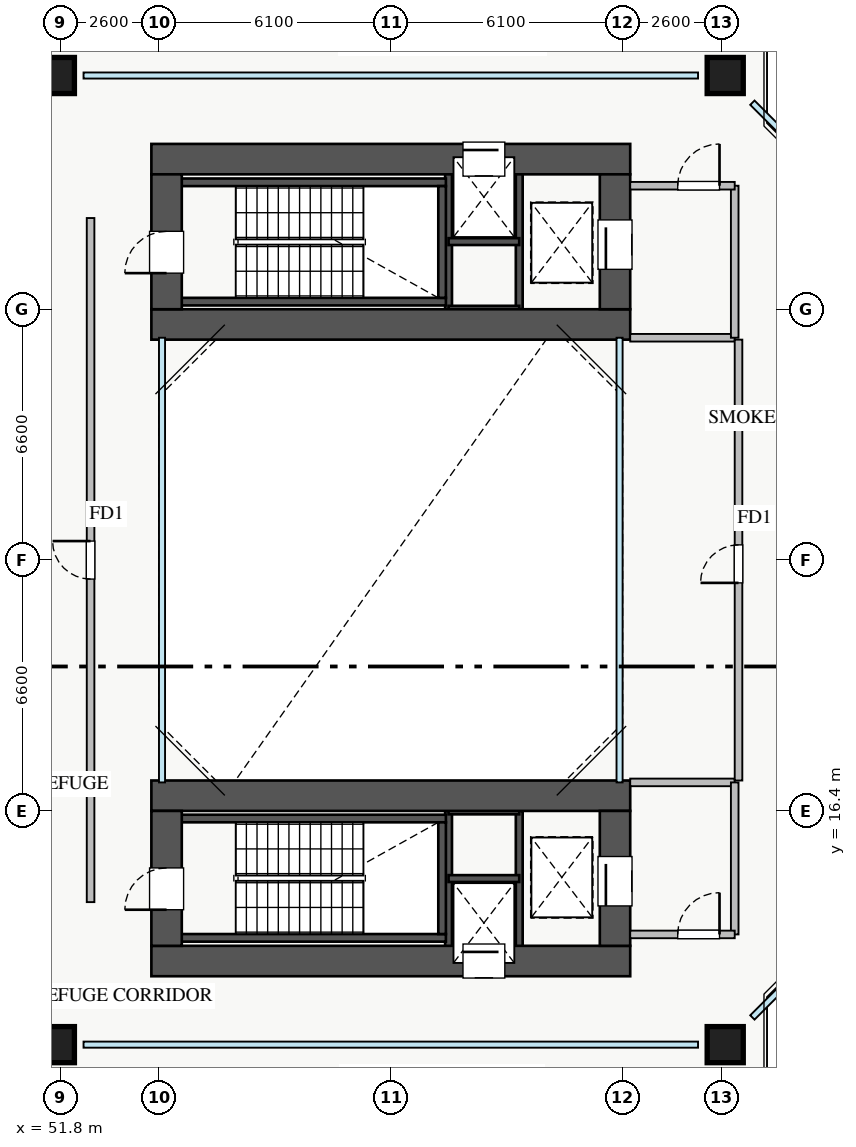
"""IFC4 building model, lengths in metres.
Left out: names, types, materials, properties, quantities, classifications, styles, units other than length and angle.
Written with IfcOpenShell. Run it as: python <this file> out.ifc"""

import sys

from ifc_helpers import new_model, si_unit, direction, frame, frame_2d, origin, origin_2d, place, context, subcontext, project, spatial, rectangle, extrude, source, transform, mapped, element, fill, save


model = new_model("IFC4")
c1 = context("Model", 3, precision=1e-05, world=origin(), true_north=direction((0.0, 1.0)))
c2 = subcontext(c1, "Body", "Model", "MODEL_VIEW")
j1 = project(units=[si_unit("LENGTHUNIT", "METRE"), si_unit("PLANEANGLEUNIT", "RADIAN")], contexts=[c1])
p1 = place(None, origin())
s1 = spatial("IfcSite", under=j1, at=p1, CompositionType="ELEMENT")
p2 = place(p1, origin())
s2 = spatial("IfcBuilding", under=s1, at=p2, CompositionType="ELEMENT")
p3 = place(p2, frame((0.0, 0.0, 45.75)))
s3 = spatial("IfcBuildingStorey", under=s2, at=p3, CompositionType="ELEMENT", Elevation=45.75)
for number, where, z_axis, x_axis in (
    (1, (62.02, 29.6, 0.0), (0.0, 0.0, 1.0), (0.0, 1.0, 0.0)),
    (2, (63.88, 29.6, 0.0), (0.0, 0.0, 1.0), (0.0, 1.0, 0.0)),
):
    element("IfcWall", number, at=place(p3, frame(where, z_axis=z_axis, x_axis=x_axis)), inside=s3, PredefinedType="SHEAR", context=c2, shape_type="SweptSolid", body=[
        extrude(rectangle(XDim=3.95, YDim=0.18, at=frame_2d((1.975, 0.0))), origin(), (0.0, 0.0, 1.0), 4.32),
    ])
for number, where, z_axis, x_axis in (
    (3, (62.02, 31.38, 0.0), (0.0, 0.0, 1.0), (1.0, 0.0, 0.0)),
    (4, (62.02, 29.6, 0.0), (0.0, 0.0, 1.0), (1.0, 0.0, 0.0)),
):
    element("IfcWall", number, at=place(p3, frame(where, z_axis=z_axis, x_axis=x_axis)), inside=s3, PredefinedType="SHEAR", context=c2, shape_type="SweptSolid", body=[
        extrude(rectangle(XDim=1.86, YDim=0.18, at=frame_2d((0.93, 0.0))), origin(), (0.0, 0.0, 1.0), 4.32),
    ])
for number, where, z_axis, x_axis in (
    (5, (62.02, 12.45, 0.0), (0.0, 0.0, 1.0), (0.0, 1.0, 0.0)),
    (6, (63.88, 12.45, 0.0), (0.0, 0.0, 1.0), (0.0, 1.0, 0.0)),
):
    element("IfcWall", number, at=place(p3, frame(where, z_axis=z_axis, x_axis=x_axis)), inside=s3, PredefinedType="SHEAR", context=c2, shape_type="SweptSolid", body=[
        extrude(rectangle(XDim=3.95, YDim=0.18, at=frame_2d((1.975, 0.0))), origin(), (0.0, 0.0, 1.0), 4.32),
    ])
for number, where, z_axis, x_axis in (
    (7, (62.02, 14.62, 0.0), (0.0, 0.0, 1.0), (1.0, 0.0, 0.0)),
    (8, (62.02, 16.4, 0.0), (0.0, 0.0, 1.0), (1.0, 0.0, 0.0)),
):
    element("IfcWall", number, at=place(p3, frame(where, z_axis=z_axis, x_axis=x_axis)), inside=s3, PredefinedType="SHEAR", context=c2, shape_type="SweptSolid", body=[
        extrude(rectangle(XDim=1.86, YDim=0.18, at=frame_2d((0.93, 0.0))), origin(), (0.0, 0.0, 1.0), 4.32),
    ])
for number, where, z_axis, x_axis in (
    (9, (54.8, 29.8, 0.0), (0.0, 0.0, 1.0), (1.0, 0.0, 0.0)),
    (10, (54.8, 32.94, 0.0), (0.0, 0.0, 1.0), (1.0, 0.0, 0.0)),
):
    element("IfcWall", number, at=place(p3, frame(where, z_axis=z_axis, x_axis=x_axis)), inside=s3, PredefinedType="SHEAR", context=c2, shape_type="SweptSolid", body=[
        extrude(rectangle(XDim=7.15, YDim=0.2, at=frame_2d((3.575, 0.0))), origin(), (0.0, 0.0, 1.0), 4.5),
    ])
p4 = place(p3, frame((61.85, 29.9, 0.0), z_axis=(0.0, 0.0, 1.0), x_axis=(0.0, 1.0, 0.0)))
e11 = element("IfcWall", 11, at=p4, inside=s3, PredefinedType="SHEAR", context=c2, shape_type="SweptSolid", body=[
    extrude(rectangle(XDim=2.94, YDim=0.2, at=frame_2d((1.47, 0.0))), origin(), (0.0, 0.0, 1.0), 4.5),
])
for number, where, z_axis, x_axis in (
    (12, (54.8, 13.06, 0.0), (0.0, 0.0, 1.0), (1.0, 0.0, 0.0)),
    (13, (54.8, 16.2, 0.0), (0.0, 0.0, 1.0), (1.0, 0.0, 0.0)),
):
    element("IfcWall", number, at=place(p3, frame(where, z_axis=z_axis, x_axis=x_axis)), inside=s3, PredefinedType="SHEAR", context=c2, shape_type="SweptSolid", body=[
        extrude(rectangle(XDim=7.15, YDim=0.2, at=frame_2d((3.575, 0.0))), origin(), (0.0, 0.0, 1.0), 4.5),
    ])
p5 = place(p3, frame((61.85, 13.16, 0.0), z_axis=(0.0, 0.0, 1.0), x_axis=(0.0, 1.0, 0.0)))
e14 = element("IfcWall", 14, at=p5, inside=s3, PredefinedType="SHEAR", context=c2, shape_type="SweptSolid", body=[
    extrude(rectangle(XDim=2.94, YDim=0.2, at=frame_2d((1.47, 0.0))), origin(), (0.0, 0.0, 1.0), 4.5),
])
p6 = place(p3, frame((54.2, 29.2, 0.0), z_axis=(0.0, 0.0, 1.0), x_axis=(1.0, 0.0, 0.0)))
e15 = element("IfcWall", 15, at=p6, inside=s3, PredefinedType="SHEAR", context=c2, shape_type="SweptSolid", body=[
    extrude(rectangle(XDim=12.6, YDim=0.8, at=frame_2d((6.3, 0.0))), origin(), (0.0, 0.0, 1.0), 4.5),
])
p7 = place(p3, frame((54.2, 33.55, 0.0), z_axis=(0.0, 0.0, 1.0), x_axis=(1.0, 0.0, 0.0)))
e16 = element("IfcWall", 16, at=p7, inside=s3, PredefinedType="SHEAR", context=c2, shape_type="SweptSolid", body=[
    extrude(rectangle(XDim=12.6, YDim=0.8, at=frame_2d((6.3, 0.0))), origin(), (0.0, 0.0, 1.0), 4.5),
])
p8 = place(p7, frame((8.2, 0.0, 0.0)))
e17 = element("IfcOpeningElement", 17, at=p8, cuts=e16, PredefinedType="OPENING", context=c2, shape_type="SweptSolid", body=[
    extrude(rectangle(XDim=1.1, YDim=2.05, at=frame_2d((0.55, 1.025))), frame((0.0, 0.41, 0.0), z_axis=(0.0, -1.0, 0.0), x_axis=(1.0, 0.0, 0.0)), (0.0, 0.0, 1.0), 0.82),
])
p9 = place(p3, frame((54.6, 29.6, 0.0), z_axis=(0.0, 0.0, 1.0), x_axis=(0.0, 1.0, 0.0)))
e18 = element("IfcWall", 18, at=p9, inside=s3, PredefinedType="SHEAR", context=c2, shape_type="SweptSolid", body=[
    extrude(rectangle(XDim=3.55, YDim=0.8, at=frame_2d((1.775, 0.0))), origin(), (0.0, 0.0, 1.0), 4.5),
])
p10 = place(p9, frame((0.95, 0.0, 0.0)))
e19 = element("IfcOpeningElement", 19, at=p10, cuts=e18, PredefinedType="OPENING", context=c2, shape_type="SweptSolid", body=[
    extrude(rectangle(XDim=1.1, YDim=2.05, at=frame_2d((0.55, 1.025))), frame((0.0, 0.41, 0.0), z_axis=(0.0, -1.0, 0.0), x_axis=(1.0, 0.0, 0.0)), (0.0, 0.0, 1.0), 0.82),
])
p11 = place(p3, frame((66.4, 29.6, 0.0), z_axis=(0.0, 0.0, 1.0), x_axis=(0.0, 1.0, 0.0)))
e20 = element("IfcWall", 20, at=p11, inside=s3, PredefinedType="SHEAR", context=c2, shape_type="SweptSolid", body=[
    extrude(rectangle(XDim=3.55, YDim=0.8, at=frame_2d((1.775, 0.0))), origin(), (0.0, 0.0, 1.0), 4.5),
])
p12 = place(p11, frame((1.05, 0.0, 0.0)))
e21 = element("IfcOpeningElement", 21, at=p12, cuts=e20, PredefinedType="OPENING", context=c2, shape_type="SweptSolid", body=[
    extrude(rectangle(XDim=1.3, YDim=2.05, at=frame_2d((0.65, 1.025))), frame((0.0, 0.41, 0.0), z_axis=(0.0, -1.0, 0.0), x_axis=(1.0, 0.0, 0.0)), (0.0, 0.0, 1.0), 0.82),
])
p13 = place(p3, frame((54.2, 12.45, 0.0), z_axis=(0.0, 0.0, 1.0), x_axis=(1.0, 0.0, 0.0)))
e22 = element("IfcWall", 22, at=p13, inside=s3, PredefinedType="SHEAR", context=c2, shape_type="SweptSolid", body=[
    extrude(rectangle(XDim=12.6, YDim=0.8, at=frame_2d((6.3, 0.0))), origin(), (0.0, 0.0, 1.0), 4.5),
])
p14 = place(p13, frame((8.2, 0.0, 0.0)))
e23 = element("IfcOpeningElement", 23, at=p14, cuts=e22, PredefinedType="OPENING", context=c2, shape_type="SweptSolid", body=[
    extrude(rectangle(XDim=1.1, YDim=2.05, at=frame_2d((0.55, 1.025))), frame((0.0, 0.41, 0.0), z_axis=(0.0, -1.0, 0.0), x_axis=(1.0, 0.0, 0.0)), (0.0, 0.0, 1.0), 0.82),
])
p15 = place(p3, frame((54.2, 16.8, 0.0), z_axis=(0.0, 0.0, 1.0), x_axis=(1.0, 0.0, 0.0)))
e24 = element("IfcWall", 24, at=p15, inside=s3, PredefinedType="SHEAR", context=c2, shape_type="SweptSolid", body=[
    extrude(rectangle(XDim=12.6, YDim=0.8, at=frame_2d((6.3, 0.0))), origin(), (0.0, 0.0, 1.0), 4.5),
])
p16 = place(p3, frame((54.6, 12.85, 0.0), z_axis=(0.0, 0.0, 1.0), x_axis=(0.0, 1.0, 0.0)))
e25 = element("IfcWall", 25, at=p16, inside=s3, PredefinedType="SHEAR", context=c2, shape_type="SweptSolid", body=[
    extrude(rectangle(XDim=3.55, YDim=0.8, at=frame_2d((1.775, 0.0))), origin(), (0.0, 0.0, 1.0), 4.5),
])
p17 = place(p16, frame((0.95, 0.0, 0.0)))
e26 = element("IfcOpeningElement", 26, at=p17, cuts=e25, PredefinedType="OPENING", context=c2, shape_type="SweptSolid", body=[
    extrude(rectangle(XDim=1.1, YDim=2.05, at=frame_2d((0.55, 1.025))), frame((0.0, 0.41, 0.0), z_axis=(0.0, -1.0, 0.0), x_axis=(1.0, 0.0, 0.0)), (0.0, 0.0, 1.0), 0.82),
])
p18 = place(p3, frame((66.4, 12.85, 0.0), z_axis=(0.0, 0.0, 1.0), x_axis=(0.0, 1.0, 0.0)))
e27 = element("IfcWall", 27, at=p18, inside=s3, PredefinedType="SHEAR", context=c2, shape_type="SweptSolid", body=[
    extrude(rectangle(XDim=3.55, YDim=0.8, at=frame_2d((1.775, 0.0))), origin(), (0.0, 0.0, 1.0), 4.5),
])
p19 = place(p18, frame((1.05, 0.0, 0.0)))
e28 = element("IfcOpeningElement", 28, at=p19, cuts=e27, PredefinedType="OPENING", context=c2, shape_type="SweptSolid", body=[
    extrude(rectangle(XDim=1.3, YDim=2.05, at=frame_2d((0.65, 1.025))), frame((0.0, 0.41, 0.0), z_axis=(0.0, -1.0, 0.0), x_axis=(1.0, 0.0, 0.0)), (0.0, 0.0, 1.0), 0.82),
])
m1 = source(origin(), c2, "Body", "SweptSolid", [
    extrude(rectangle(XDim=0.95, YDim=0.95, at=origin_2d()), origin(), (0.0, 0.0, 1.0), 4.5),
])
for number, where, z_axis, x_axis in (
    (29, (51.7, 10.25, 0.0), (0.0, 0.0, 1.0), (1.0, 0.0, 0.0)),
    (30, (69.3, 10.25, 0.0), (0.0, 0.0, 1.0), (1.0, 0.0, 0.0)),
    (31, (69.3, 35.75, 0.0), (0.0, 0.0, 1.0), (1.0, 0.0, 0.0)),
    (32, (51.7, 35.75, 0.0), (0.0, 0.0, 1.0), (1.0, 0.0, 0.0)),
):
    element("IfcColumn", number, at=place(p3, frame(where, z_axis=z_axis, x_axis=x_axis)), inside=s3, PredefinedType="COLUMN", context=c2, shape_type="MappedRepresentation", body=[
        mapped(m1, transform((0.0, 0.0, 0.0), x_axis=(1.0, 0.0, 0.0), y_axis=(0.0, 1.0, 0.0), z_axis=(0.0, 0.0, 1.0), scale=1.0)),
    ])
p20 = place(p3, frame((66.8, 28.85, 0.0), z_axis=(0.0, 0.0, 1.0), x_axis=(1.0, 0.0, 0.0)))
e33 = element("IfcWall", 33, at=p20, inside=s3, PredefinedType="PARTITIONING", context=c2, shape_type="SweptSolid", body=[
    extrude(rectangle(XDim=2.75, YDim=0.2, at=frame_2d((1.375, 0.0))), origin(), (0.0, 0.0, 1.0), 4.32),
])
p21 = place(p3, frame((69.55, 28.85, 0.0), z_axis=(0.0, 0.0, 1.0), x_axis=(0.0, 1.0, 0.0)))
e34 = element("IfcWall", 34, at=p21, inside=s3, PredefinedType="PARTITIONING", context=c2, shape_type="SweptSolid", body=[
    extrude(rectangle(XDim=4.0, YDim=0.2, at=frame_2d((2.0, 0.0))), origin(), (0.0, 0.0, 1.0), 3.865),
])
p22 = place(p3, frame((66.8, 32.85, 0.0), z_axis=(0.0, 0.0, 1.0), x_axis=(1.0, 0.0, 0.0)))
e35 = element("IfcWall", 35, at=p22, inside=s3, PredefinedType="PARTITIONING", context=c2, shape_type="SweptSolid", body=[
    extrude(rectangle(XDim=2.75, YDim=0.2, at=frame_2d((1.375, 0.0))), origin(), (0.0, 0.0, 1.0), 4.32),
])
p23 = place(p22, frame((1.25, 0.0, 0.0)))
e36 = element("IfcOpeningElement", 36, at=p23, cuts=e35, PredefinedType="OPENING", context=c2, shape_type="SweptSolid", body=[
    extrude(rectangle(XDim=1.1, YDim=2.05, at=frame_2d((0.55, 1.025))), frame((0.0, 0.11, 0.0), z_axis=(0.0, -1.0, 0.0), x_axis=(1.0, 0.0, 0.0)), (0.0, 0.0, 1.0), 0.22),
])
p24 = place(p3, frame((66.8, 17.15, 0.0), z_axis=(0.0, 0.0, 1.0), x_axis=(1.0, 0.0, 0.0)))
e37 = element("IfcWall", 37, at=p24, inside=s3, PredefinedType="PARTITIONING", context=c2, shape_type="SweptSolid", body=[
    extrude(rectangle(XDim=2.75, YDim=0.2, at=frame_2d((1.375, 0.0))), origin(), (0.0, 0.0, 1.0), 4.32),
])
p25 = place(p3, frame((69.55, 13.15, 0.0), z_axis=(0.0, 0.0, 1.0), x_axis=(0.0, 1.0, 0.0)))
e38 = element("IfcWall", 38, at=p25, inside=s3, PredefinedType="PARTITIONING", context=c2, shape_type="SweptSolid", body=[
    extrude(rectangle(XDim=4.0, YDim=0.2, at=frame_2d((2.0, 0.0))), origin(), (0.0, 0.0, 1.0), 3.865),
])
p26 = place(p3, frame((66.8, 13.15, 0.0), z_axis=(0.0, 0.0, 1.0), x_axis=(1.0, 0.0, 0.0)))
e39 = element("IfcWall", 39, at=p26, inside=s3, PredefinedType="PARTITIONING", context=c2, shape_type="SweptSolid", body=[
    extrude(rectangle(XDim=2.75, YDim=0.2, at=frame_2d((1.375, 0.0))), origin(), (0.0, 0.0, 1.0), 4.32),
])
p27 = place(p26, frame((1.25, 0.0, 0.0)))
e40 = element("IfcOpeningElement", 40, at=p27, cuts=e39, PredefinedType="OPENING", context=c2, shape_type="SweptSolid", body=[
    extrude(rectangle(XDim=1.1, YDim=2.05, at=frame_2d((0.55, 1.025))), frame((0.0, 0.11, 0.0), z_axis=(0.0, -1.0, 0.0), x_axis=(1.0, 0.0, 0.0)), (0.0, 0.0, 1.0), 0.22),
])
p28 = place(p3, frame((52.6, 14.0, 0.0), z_axis=(0.0, 0.0, 1.0), x_axis=(0.0, 1.0, 0.0)))
e41 = element("IfcWall", 41, at=p28, inside=s3, PredefinedType="PARTITIONING", context=c2, shape_type="SweptSolid", body=[
    extrude(rectangle(XDim=18.0, YDim=0.2, at=frame_2d((9.0, 0.0))), origin(), (0.0, 0.0, 1.0), 4.32),
])
p29 = place(p28, frame((8.5, 0.0, 0.0)))
e42 = element("IfcOpeningElement", 42, at=p29, cuts=e41, PredefinedType="OPENING", context=c2, shape_type="SweptSolid", body=[
    extrude(rectangle(XDim=1.0, YDim=2.05, at=frame_2d((0.5, 1.025))), frame((0.0, 0.11, 0.0), z_axis=(0.0, -1.0, 0.0), x_axis=(1.0, 0.0, 0.0)), (0.0, 0.0, 1.0), 0.22),
])
p30 = place(p3, frame((69.65, 17.2, 0.0), z_axis=(0.0, 0.0, 1.0), x_axis=(0.0, 1.0, 0.0)))
e43 = element("IfcWall", 43, at=p30, inside=s3, PredefinedType="PARTITIONING", context=c2, shape_type="SweptSolid", body=[
    extrude(rectangle(XDim=11.6, YDim=0.2, at=frame_2d((5.8, 0.0))), origin(), (0.0, 0.0, 1.0), 4.32),
])
p31 = place(p30, frame((5.2, 0.0, 0.0)))
e44 = element("IfcOpeningElement", 44, at=p31, cuts=e43, PredefinedType="OPENING", context=c2, shape_type="SweptSolid", body=[
    extrude(rectangle(XDim=1.0, YDim=2.05, at=frame_2d((0.5, 1.025))), frame((0.0, 0.11, 0.0), z_axis=(0.0, -1.0, 0.0), x_axis=(1.0, 0.0, 0.0)), (0.0, 0.0, 1.0), 0.22),
])
m2 = source(origin(), c2, "Body", "SweptSolid", [
    extrude(rectangle(XDim=1.3, YDim=2.05, at=frame_2d((0.65, 1.025))), frame((0.0, 0.025, 0.0), z_axis=(0.0, -1.0, 0.0), x_axis=(1.0, 0.0, 0.0)), (0.0, 0.0, 1.0), 0.05),
])
p32 = place(p12, origin())
e45 = element("IfcDoor", 45, at=p32, inside=s3, OperationType="SLIDING_TO_LEFT", PredefinedType="DOOR", context=c2, shape_type="MappedRepresentation", body=[
    mapped(m2, transform((0.0, 0.0, 0.0), x_axis=(1.0, 0.0, 0.0), y_axis=(0.0, 1.0, 0.0), z_axis=(0.0, 0.0, 1.0), scale=1.0)),
])
fill(e21, e45)
m3 = source(origin(), c2, "Body", "SweptSolid", [
    extrude(rectangle(XDim=1.1, YDim=2.05, at=frame_2d((0.55, 1.025))), frame((0.0, 0.025, 0.0), z_axis=(0.0, -1.0, 0.0), x_axis=(1.0, 0.0, 0.0)), (0.0, 0.0, 1.0), 0.05),
])
p33 = place(p10, origin())
e46 = element("IfcDoor", 46, at=p33, inside=s3, OperationType="SINGLE_SWING_LEFT", PredefinedType="DOOR", context=c2, shape_type="MappedRepresentation", body=[
    mapped(m3, transform((0.0, 0.0, 0.0), x_axis=(1.0, 0.0, 0.0), y_axis=(0.0, 1.0, 0.0), z_axis=(0.0, 0.0, 1.0), scale=1.0)),
])
fill(e19, e46)
p34 = place(p8, origin())
e47 = element("IfcDoor", 47, at=p34, inside=s3, OperationType="SLIDING_TO_LEFT", PredefinedType="DOOR", context=c2, shape_type="MappedRepresentation", body=[
    mapped(m3, transform((0.0, 0.0, 0.0), x_axis=(1.0, 0.0, 0.0), y_axis=(0.0, 1.0, 0.0), z_axis=(0.0, 0.0, 1.0), scale=1.0)),
])
fill(e17, e47)
p35 = place(p19, origin())
e48 = element("IfcDoor", 48, at=p35, inside=s3, OperationType="SLIDING_TO_RIGHT", PredefinedType="DOOR", context=c2, shape_type="MappedRepresentation", body=[
    mapped(m2, transform((0.0, 0.0, 0.0), x_axis=(1.0, 0.0, 0.0), y_axis=(0.0, 1.0, 0.0), z_axis=(0.0, 0.0, 1.0), scale=1.0)),
])
fill(e28, e48)
p36 = place(p17, origin())
e49 = element("IfcDoor", 49, at=p36, inside=s3, OperationType="SINGLE_SWING_LEFT", PredefinedType="DOOR", context=c2, shape_type="MappedRepresentation", body=[
    mapped(m3, transform((0.0, 0.0, 0.0), x_axis=(1.0, 0.0, 0.0), y_axis=(0.0, 1.0, 0.0), z_axis=(0.0, 0.0, 1.0), scale=1.0)),
])
fill(e26, e49)
p37 = place(p14, origin())
e50 = element("IfcDoor", 50, at=p37, inside=s3, OperationType="SLIDING_TO_RIGHT", PredefinedType="DOOR", context=c2, shape_type="MappedRepresentation", body=[
    mapped(m3, transform((0.0, 0.0, 0.0), x_axis=(1.0, 0.0, 0.0), y_axis=(0.0, 1.0, 0.0), z_axis=(0.0, 0.0, 1.0), scale=1.0)),
])
fill(e23, e50)
p38 = place(p23, origin())
e51 = element("IfcDoor", 51, at=p38, inside=s3, OperationType="SINGLE_SWING_RIGHT", PredefinedType="DOOR", context=c2, shape_type="MappedRepresentation", body=[
    mapped(m3, transform((0.0, 0.0, 0.0), x_axis=(1.0, 0.0, 0.0), y_axis=(0.0, 1.0, 0.0), z_axis=(0.0, 0.0, 1.0), scale=1.0)),
])
fill(e36, e51)
p39 = place(p27, origin())
e52 = element("IfcDoor", 52, at=p39, inside=s3, OperationType="SINGLE_SWING_RIGHT", PredefinedType="DOOR", context=c2, shape_type="MappedRepresentation", body=[
    mapped(m3, transform((0.0, 0.0, 0.0), x_axis=(1.0, 0.0, 0.0), y_axis=(0.0, 1.0, 0.0), z_axis=(0.0, 0.0, 1.0), scale=1.0)),
])
fill(e40, e52)
m4 = source(origin(), c2, "Body", "SweptSolid", [
    extrude(rectangle(XDim=1.0, YDim=2.05, at=frame_2d((0.5, 1.025))), frame((0.0, 0.025, 0.0), z_axis=(0.0, -1.0, 0.0), x_axis=(1.0, 0.0, 0.0)), (0.0, 0.0, 1.0), 0.05),
])
p40 = place(p29, origin())
e53 = element("IfcDoor", 53, at=p40, inside=s3, OperationType="SINGLE_SWING_RIGHT", PredefinedType="DOOR", context=c2, shape_type="MappedRepresentation", body=[
    mapped(m4, transform((0.0, 0.0, 0.0), x_axis=(1.0, 0.0, 0.0), y_axis=(0.0, 1.0, 0.0), z_axis=(0.0, 0.0, 1.0), scale=1.0)),
])
fill(e42, e53)
p41 = place(p31, origin())
e54 = element("IfcDoor", 54, at=p41, inside=s3, OperationType="SINGLE_SWING_LEFT", PredefinedType="DOOR", context=c2, shape_type="MappedRepresentation", body=[
    mapped(m4, transform((0.0, 0.0, 0.0), x_axis=(1.0, 0.0, 0.0), y_axis=(0.0, 1.0, 0.0), z_axis=(0.0, 0.0, 1.0), scale=1.0)),
])
fill(e44, e54)
save(model, sys.argv[1])
